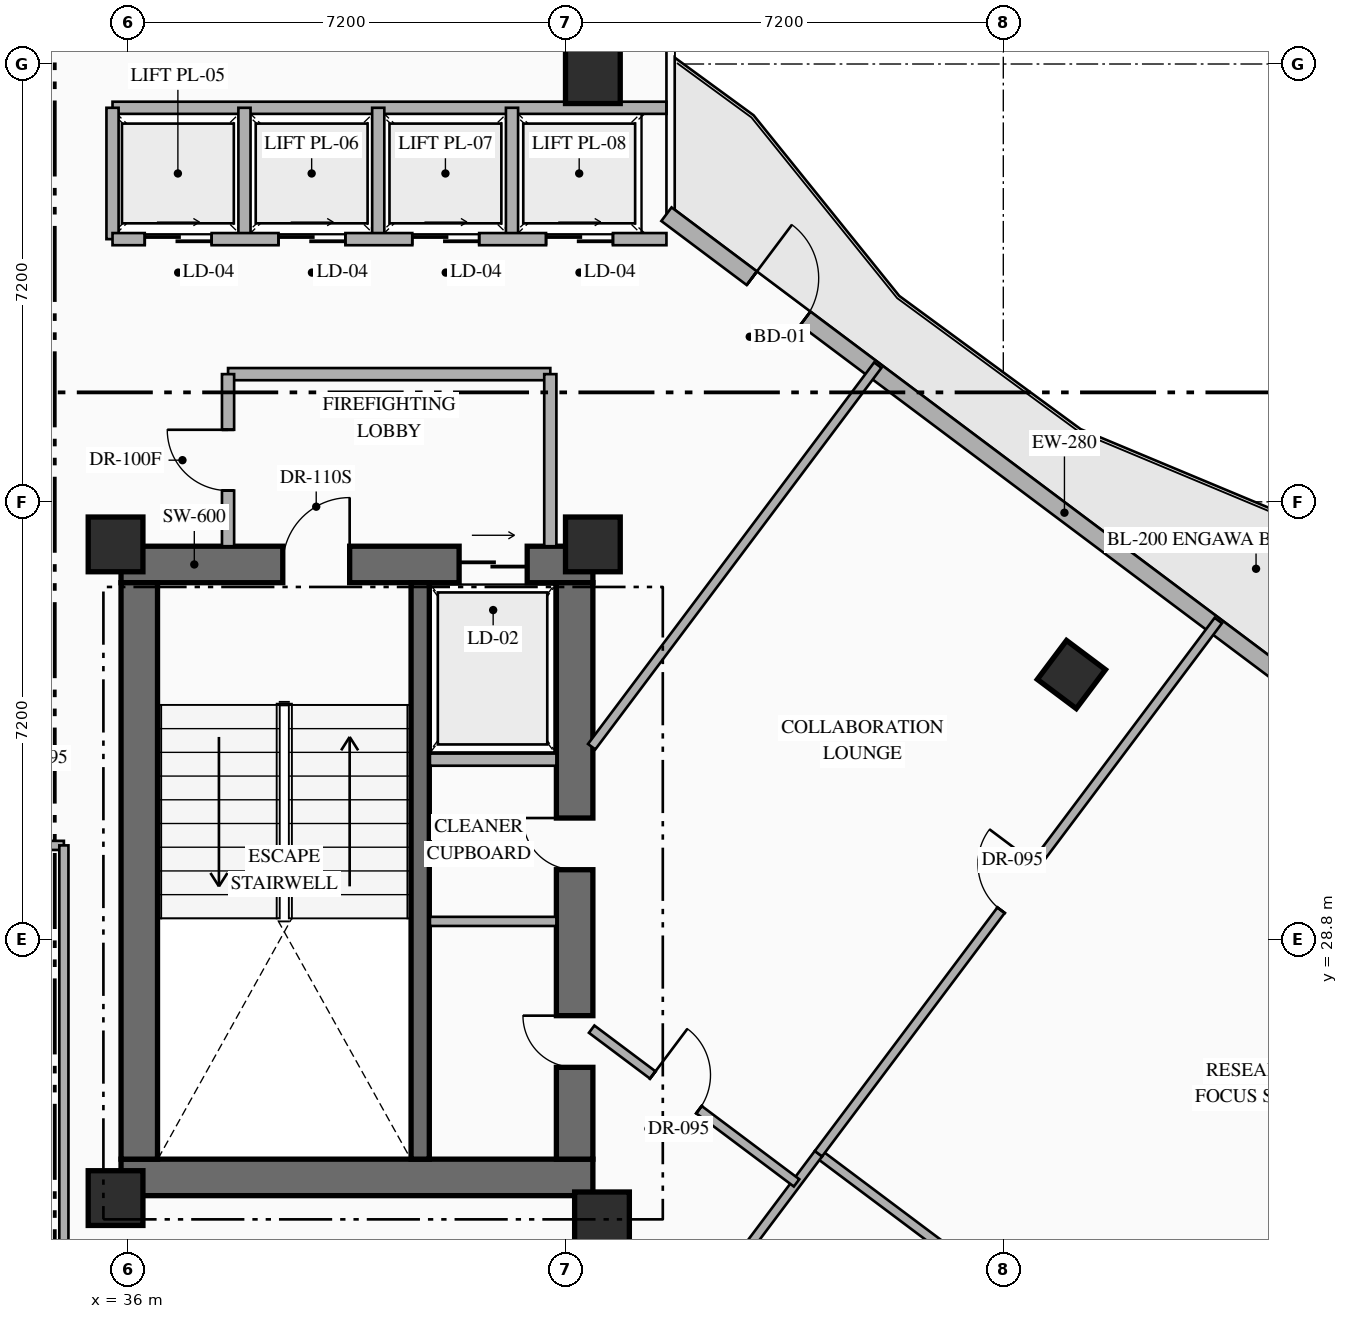
"""IFC4 building model, lengths in metres.
Left out: names, types, materials, properties, quantities, classifications, styles, units other than length and angle.
Written with IfcOpenShell. Run it as: python <this file> out.ifc"""

import sys

from ifc_helpers import new_model, si_unit, direction, frame, frame_2d, origin, origin_2d, place, context, subcontext, project, spatial, rectangle, hollow_rectangle, extrude, element, fill, save


model = new_model("IFC4")
c1 = context("Model", 3, precision=1e-05, world=origin(), true_north=direction((0.0, 1.0)))
c2 = subcontext(c1, "Body", "Model", "MODEL_VIEW")
j1 = project(units=[si_unit("LENGTHUNIT", "METRE"), si_unit("PLANEANGLEUNIT", "RADIAN")], contexts=[c1])
p1 = place(None, origin())
s1 = spatial("IfcSite", under=j1, at=p1, CompositionType="ELEMENT")
p2 = place(p1, origin())
s2 = spatial("IfcBuilding", under=s1, at=p2, CompositionType="ELEMENT")
p3 = place(p2, frame((0.0, 0.0, 174.45)))
s3 = spatial("IfcBuildingStorey", under=s2, at=p3, CompositionType="ELEMENT", Elevation=174.45)
p4 = place(p3, frame((35.89, 24.89, 0.0), z_axis=(0.0, 0.0, 1.0), x_axis=(1.0, 0.0, 0.0)))
e1 = element("IfcWall", 1, at=p4, inside=s3, PredefinedType="SHEAR", context=c2, shape_type="SweptSolid", body=[
    extrude(rectangle(XDim=7.76, YDim=0.6, at=frame_2d((3.88, 0.0))), origin(), (0.0, 0.0, 1.0), 3.6),
])
p5 = place(p3, frame((35.89, 34.97, 0.0), z_axis=(0.0, 0.0, 1.0), x_axis=(1.0, 0.0, 0.0)))
e2 = element("IfcWall", 2, at=p5, inside=s3, PredefinedType="SHEAR", context=c2, shape_type="SweptSolid", body=[
    extrude(rectangle(XDim=7.76, YDim=0.6, at=frame_2d((3.88, 0.0))), origin(), (0.0, 0.0, 1.0), 3.6),
])
p6 = place(p5, frame((2.66, 0.0, 0.0)))
e3 = element("IfcOpeningElement", 3, at=p6, cuts=e2, PredefinedType="OPENING", context=c2, shape_type="SweptSolid", body=[
    extrude(rectangle(XDim=1.1, YDim=2.2, at=frame_2d((0.55, 1.1))), frame((0.0, 0.31, 0.0), z_axis=(0.0, -1.0, 0.0), x_axis=(1.0, 0.0, 0.0)), (0.0, 0.0, 1.0), 0.62),
])
p7 = place(p5, frame((5.56, 0.0, 0.0)))
e4 = element("IfcOpeningElement", 4, at=p7, cuts=e2, PredefinedType="OPENING", context=c2, shape_type="SweptSolid", body=[
    extrude(rectangle(XDim=1.12, YDim=2.15, at=frame_2d((0.56, 1.075))), frame((0.0, 0.31, 0.0), z_axis=(0.0, -1.0, 0.0), x_axis=(1.0, 0.0, 0.0)), (0.0, 0.0, 1.0), 0.62),
])
p8 = place(p3, frame((36.19, 25.19, 0.0), z_axis=(0.0, 0.0, 1.0), x_axis=(0.0, 1.0, 0.0)))
e5 = element("IfcWall", 5, at=p8, inside=s3, PredefinedType="SHEAR", context=c2, shape_type="SweptSolid", body=[
    extrude(rectangle(XDim=9.48, YDim=0.6, at=frame_2d((4.74, 0.0))), origin(), (0.0, 0.0, 1.0), 3.6),
])
p9 = place(p3, frame((43.35, 25.19, 0.0), z_axis=(0.0, 0.0, 1.0), x_axis=(0.0, 1.0, 0.0)))
e6 = element("IfcWall", 6, at=p9, inside=s3, PredefinedType="SHEAR", context=c2, shape_type="SweptSolid", body=[
    extrude(rectangle(XDim=9.48, YDim=0.6, at=frame_2d((4.74, 0.0))), origin(), (0.0, 0.0, 1.0), 3.6),
])
p10 = place(p9, frame((1.51, 0.0, 0.0)))
e7 = element("IfcOpeningElement", 7, at=p10, cuts=e6, PredefinedType="OPENING", context=c2, shape_type="SweptSolid", body=[
    extrude(rectangle(XDim=0.85, YDim=2.08, at=frame_2d((0.425, 1.04))), frame((0.0, 0.31, 0.0), z_axis=(0.0, -1.0, 0.0), x_axis=(1.0, 0.0, 0.0)), (0.0, 0.0, 1.0), 0.62),
])
p11 = place(p9, frame((4.76, 0.0, 0.0)))
e8 = element("IfcOpeningElement", 8, at=p11, cuts=e6, PredefinedType="OPENING", context=c2, shape_type="SweptSolid", body=[
    extrude(rectangle(XDim=0.85, YDim=2.08, at=frame_2d((0.425, 1.04))), frame((0.0, 0.31, 0.0), z_axis=(0.0, -1.0, 0.0), x_axis=(1.0, 0.0, 0.0)), (0.0, 0.0, 1.0), 0.62),
])
p12 = place(p3, frame((40.81, 25.19, 0.0), z_axis=(0.0, 0.0, 1.0), x_axis=(0.0, 1.0, 0.0)))
e9 = element("IfcWall", 9, at=p12, inside=s3, PredefinedType="SHEAR", context=c2, shape_type="SweptSolid", body=[
    extrude(rectangle(XDim=9.48, YDim=0.3, at=frame_2d((4.74, 0.0))), origin(), (0.0, 0.0, 1.0), 3.6),
])
for number, where, z_axis, x_axis in (
    (10, (35.8, 24.55, 0.0), (0.0, 0.0, 1.0), (1.0, 0.0, 0.0)),
    (11, (43.8, 24.2, 0.0), (0.0, 0.0, 1.0), (1.0, 0.0, 0.0)),
    (12, (35.8, 35.3, 0.0), (0.0, 0.0, 1.0), (1.0, 0.0, 0.0)),
    (13, (43.65, 35.3, 0.0), (0.0, 0.0, 1.0), (1.0, 0.0, 0.0)),
    (14, (43.65, 43.0, 0.0), (0.0, 0.0, 1.0), (1.0, 0.0, 0.0)),
):
    element("IfcColumn", number, at=place(p3, frame(where, z_axis=z_axis, x_axis=x_axis)), inside=s3, PredefinedType="COLUMN", context=c2, shape_type="SweptSolid", body=[
        extrude(rectangle(XDim=0.9, YDim=0.9, at=origin_2d()), origin(), (0.0, 0.0, 1.0), 3.6),
    ])
p13 = place(p3, frame((51.52, 33.16, 0.0), z_axis=(0.0, 0.0, 1.0), x_axis=(0.799999996291, -0.600000004945, 0.0)))
e15 = element("IfcColumn", 15, at=p13, inside=s3, PredefinedType="COLUMN", context=c2, shape_type="SweptSolid", body=[
    extrude(hollow_rectangle(XDim=0.8, YDim=0.8, WallThickness=0.032, at=origin_2d()), origin(), (0.0, 0.0, 1.0), 3.6),
])
p14 = place(p3, frame((44.86, 40.73, 0.0), z_axis=(0.0, 0.0, 1.0), x_axis=(0.800007624502, -0.599989833863, 0.0)))
e16 = element("IfcWall", 16, at=p14, inside=s3, PredefinedType="STANDARD", context=c2, shape_type="SweptSolid", body=[
    extrude(rectangle(XDim=19.212, YDim=0.28, at=frame_2d((9.606, 0.0))), origin(), (0.0, 0.0, 1.0), 3.35),
])
p15 = place(p14, frame((1.755, 0.0, 0.0)))
e17 = element("IfcOpeningElement", 17, at=p15, cuts=e16, PredefinedType="OPENING", context=c2, shape_type="SweptSolid", body=[
    extrude(rectangle(XDim=1.1, YDim=2.2, at=frame_2d((0.55, 1.1))), frame((0.0, 0.15, 0.0), z_axis=(0.0, -1.0, 0.0), x_axis=(1.0, 0.0, 0.0)), (0.0, 0.0, 1.0), 0.3),
])
p16 = place(p14, frame((13.509, 0.0, 0.85)))
e18 = element("IfcOpeningElement", 18, at=p16, cuts=e16, PredefinedType="OPENING", context=c2, shape_type="SweptSolid", body=[
    extrude(rectangle(XDim=1.8, YDim=2.1, at=frame_2d((0.9, 1.05))), frame((0.0, 0.15, 0.0), z_axis=(0.0, -1.0, 0.0), x_axis=(1.0, 0.0, 0.0)), (0.0, 0.0, 1.0), 0.3),
])
p17 = place(p3, frame((40.97, 31.76, 0.0), z_axis=(0.0, 0.0, 1.0), x_axis=(1.0, 0.0, 0.0)))
e19 = element("IfcWall", 19, at=p17, inside=s3, PredefinedType="STANDARD", context=c2, shape_type="SweptSolid", body=[
    extrude(rectangle(XDim=2.08, YDim=0.2, at=frame_2d((1.04, 0.0))), origin(), (0.0, 0.0, 1.0), 3.35),
])
p18 = place(p3, frame((40.97, 29.1, 0.0), z_axis=(0.0, 0.0, 1.0), x_axis=(1.0, 0.0, 0.0)))
e20 = element("IfcWall", 20, at=p18, inside=s3, PredefinedType="PARTITIONING", context=c2, shape_type="SweptSolid", body=[
    extrude(rectangle(XDim=2.08, YDim=0.15, at=frame_2d((1.04, 0.0))), origin(), (0.0, 0.0, 1.0), 3.35),
])
p19 = place(p3, frame((37.65, 38.1, 0.0), z_axis=(0.0, 0.0, 1.0), x_axis=(1.0, 0.0, 0.0)))
e21 = element("IfcWall", 21, at=p19, inside=s3, PredefinedType="STANDARD", context=c2, shape_type="SweptSolid", body=[
    extrude(rectangle(XDim=5.3, YDim=0.2, at=frame_2d((2.65, 0.0))), origin(), (0.0, 0.0, 1.0), 3.35),
])
p20 = place(p3, frame((42.95, 35.27, 0.0), z_axis=(0.0, 0.0, 1.0), x_axis=(0.0, 1.0, 0.0)))
e22 = element("IfcWall", 22, at=p20, inside=s3, PredefinedType="STANDARD", context=c2, shape_type="SweptSolid", body=[
    extrude(rectangle(XDim=2.83, YDim=0.2, at=frame_2d((1.415, 0.0))), origin(), (0.0, 0.0, 1.0), 3.35),
])
p21 = place(p3, frame((37.65, 35.27, 0.0), z_axis=(0.0, 0.0, 1.0), x_axis=(0.0, 1.0, 0.0)))
e23 = element("IfcWall", 23, at=p21, inside=s3, PredefinedType="STANDARD", context=c2, shape_type="SweptSolid", body=[
    extrude(rectangle(XDim=2.83, YDim=0.2, at=frame_2d((1.415, 0.0))), origin(), (0.0, 0.0, 1.0), 3.35),
])
p22 = place(p21, frame((0.915, 0.0, 0.0)))
e24 = element("IfcOpeningElement", 24, at=p22, cuts=e23, PredefinedType="OPENING", context=c2, shape_type="SweptSolid", body=[
    extrude(rectangle(XDim=1.0, YDim=2.2, at=frame_2d((0.5, 1.1))), frame((0.0, 0.11, 0.0), z_axis=(0.0, -1.0, 0.0), x_axis=(1.0, 0.0, 0.0)), (0.0, 0.0, 1.0), 0.22),
])
p23 = place(p3, frame((35.75, 42.48, 0.0), z_axis=(0.0, 0.0, 1.0), x_axis=(1.0, 0.0, 0.0)))
e25 = element("IfcWall", 25, at=p23, inside=s3, PredefinedType="STANDARD", context=c2, shape_type="SweptSolid", body=[
    extrude(rectangle(XDim=9.11, YDim=0.2, at=frame_2d((4.555, 0.0))), origin(), (0.0, 0.0, 1.0), 3.35),
])
for number, where, z_axis, x_axis in (
    (26, (35.75, 40.32, 0.0), (0.0, 0.0, 1.0), (0.0, 1.0, 0.0)),
    (27, (37.92, 40.32, 0.0), (0.0, 0.0, 1.0), (0.0, 1.0, 0.0)),
    (28, (40.12, 40.32, 0.0), (0.0, 0.0, 1.0), (0.0, 1.0, 0.0)),
    (29, (42.32, 40.32, 0.0), (0.0, 0.0, 1.0), (0.0, 1.0, 0.0)),
):
    element("IfcWall", number, at=place(p3, frame(where, z_axis=z_axis, x_axis=x_axis)), inside=s3, PredefinedType="STANDARD", context=c2, shape_type="SweptSolid", body=[
        extrude(rectangle(XDim=2.16, YDim=0.2, at=frame_2d((1.08, 0.0))), origin(), (0.0, 0.0, 1.0), 3.35),
    ])
p24 = place(p3, frame((35.75, 40.32, 0.0), z_axis=(0.0, 0.0, 1.0), x_axis=(1.0, 0.0, 0.0)))
e30 = element("IfcWall", 30, at=p24, inside=s3, PredefinedType="STANDARD", context=c2, shape_type="SweptSolid", body=[
    extrude(rectangle(XDim=9.11, YDim=0.2, at=frame_2d((4.555, 0.0))), origin(), (0.0, 0.0, 1.0), 3.35),
])
p25 = place(p24, frame((0.53, 0.0, 0.0)))
e31 = element("IfcOpeningElement", 31, at=p25, cuts=e30, PredefinedType="OPENING", context=c2, shape_type="SweptSolid", body=[
    extrude(rectangle(XDim=1.1, YDim=2.18, at=frame_2d((0.55, 1.09))), frame((0.0, 0.11, 0.0), z_axis=(0.0, -1.0, 0.0), x_axis=(1.0, 0.0, 0.0)), (0.0, 0.0, 1.0), 0.22),
])
p26 = place(p24, frame((2.73, 0.0, 0.0)))
e32 = element("IfcOpeningElement", 32, at=p26, cuts=e30, PredefinedType="OPENING", context=c2, shape_type="SweptSolid", body=[
    extrude(rectangle(XDim=1.1, YDim=2.18, at=frame_2d((0.55, 1.09))), frame((0.0, 0.11, 0.0), z_axis=(0.0, -1.0, 0.0), x_axis=(1.0, 0.0, 0.0)), (0.0, 0.0, 1.0), 0.22),
])
p27 = place(p24, frame((4.93, 0.0, 0.0)))
e33 = element("IfcOpeningElement", 33, at=p27, cuts=e30, PredefinedType="OPENING", context=c2, shape_type="SweptSolid", body=[
    extrude(rectangle(XDim=1.1, YDim=2.18, at=frame_2d((0.55, 1.09))), frame((0.0, 0.11, 0.0), z_axis=(0.0, -1.0, 0.0), x_axis=(1.0, 0.0, 0.0)), (0.0, 0.0, 1.0), 0.22),
])
p28 = place(p24, frame((7.13, 0.0, 0.0)))
e34 = element("IfcOpeningElement", 34, at=p28, cuts=e30, PredefinedType="OPENING", context=c2, shape_type="SweptSolid", body=[
    extrude(rectangle(XDim=1.1, YDim=2.18, at=frame_2d((0.55, 1.09))), frame((0.0, 0.11, 0.0), z_axis=(0.0, -1.0, 0.0), x_axis=(1.0, 0.0, 0.0)), (0.0, 0.0, 1.0), 0.22),
])
p29 = place(p3, frame((30.5, 30.35, 0.0), z_axis=(0.0, 0.0, 1.0), x_axis=(1.0, 0.0, 0.0)))
e35 = element("IfcWall", 35, at=p29, inside=s3, PredefinedType="PARTITIONING", context=c2, shape_type="SweptSolid", body=[
    extrude(rectangle(XDim=4.45, YDim=0.15, at=frame_2d((2.225, 0.0))), origin(), (0.0, 0.0, 1.0), 3.35),
])
p30 = place(p29, frame((2.846, 0.0, 0.0)))
e36 = element("IfcOpeningElement", 36, at=p30, cuts=e35, PredefinedType="OPENING", context=c2, shape_type="SweptSolid", body=[
    extrude(rectangle(XDim=0.95, YDim=2.15, at=frame_2d((0.475, 1.075))), frame((0.0, 0.085, 0.0), z_axis=(0.0, -1.0, 0.0), x_axis=(1.0, 0.0, 0.0)), (0.0, 0.0, 1.0), 0.17),
])
p31 = place(p3, frame((34.95, 23.2, 0.0), z_axis=(0.0, 0.0, 1.0), x_axis=(0.0, 1.0, 0.0)))
e37 = element("IfcWall", 37, at=p31, inside=s3, PredefinedType="PARTITIONING", context=c2, shape_type="SweptSolid", body=[
    extrude(rectangle(XDim=7.15, YDim=0.15, at=frame_2d((3.575, 0.0))), origin(), (0.0, 0.0, 1.0), 3.35),
])
p32 = place(p3, frame((47.36, 25.28, 0.0), z_axis=(0.0, 0.0, 1.0), x_axis=(0.799991516197, -0.600011311571, 0.0)))
e38 = element("IfcWall", 38, at=p32, inside=s3, PredefinedType="PARTITIONING", context=c2, shape_type="SweptSolid", body=[
    extrude(rectangle(XDim=10.36, YDim=0.15, at=frame_2d((5.18, 0.0))), origin(), (0.0, 0.0, 1.0), 3.35),
])
p33 = place(p3, frame((41.87, 17.96, 0.0), z_axis=(0.0, 0.0, 1.0), x_axis=(0.599995730889, 0.800003201816, 0.0)))
e39 = element("IfcWall", 39, at=p33, inside=s3, PredefinedType="PARTITIONING", context=c2, shape_type="SweptSolid", body=[
    extrude(rectangle(XDim=9.15, YDim=0.15, at=frame_2d((4.575, 0.0))), origin(), (0.0, 0.0, 1.0), 3.35),
])
p34 = place(p33, frame((4.1, 0.0, 0.0)))
e40 = element("IfcOpeningElement", 40, at=p34, cuts=e39, PredefinedType="OPENING", context=c2, shape_type="SweptSolid", body=[
    extrude(rectangle(XDim=0.95, YDim=2.15, at=frame_2d((0.475, 1.075))), frame((0.0, 0.085, 0.0), z_axis=(0.0, -1.0, 0.0), x_axis=(1.0, 0.0, 0.0)), (0.0, 0.0, 1.0), 0.17),
])
p35 = place(p3, frame((47.36, 25.28, 0.0), z_axis=(0.0, 0.0, 1.0), x_axis=(0.599992871789, 0.800005346109, 0.0)))
e41 = element("IfcWall", 41, at=p35, inside=s3, PredefinedType="PARTITIONING", context=c2, shape_type="SweptSolid", body=[
    extrude(rectangle(XDim=10.96, YDim=0.15, at=frame_2d((5.48, 0.0))), origin(), (0.0, 0.0, 1.0), 3.35),
])
p36 = place(p35, frame((5.005, 0.0, 0.0)))
e42 = element("IfcOpeningElement", 42, at=p36, cuts=e41, PredefinedType="OPENING", context=c2, shape_type="SweptSolid", body=[
    extrude(rectangle(XDim=0.95, YDim=2.15, at=frame_2d((0.475, 1.075))), frame((0.0, 0.085, 0.0), z_axis=(0.0, -1.0, 0.0), x_axis=(1.0, 0.0, 0.0)), (0.0, 0.0, 1.0), 0.17),
])
p37 = place(p3, frame((43.63, 27.328, 0.0), z_axis=(0.0, 0.0, 1.0), x_axis=(0.799972182084, -0.600037088764, 0.0)))
e43 = element("IfcWall", 43, at=p37, inside=s3, PredefinedType="PARTITIONING", context=c2, shape_type="SweptSolid", body=[
    extrude(rectangle(XDim=4.213, YDim=0.15, at=frame_2d((2.106, 0.0))), origin(), (0.0, 0.0, 1.0), 3.045),
])
p38 = place(p37, frame((1.256, 0.0, 0.0)))
e44 = element("IfcOpeningElement", 44, at=p38, cuts=e43, PredefinedType="OPENING", context=c2, shape_type="SweptSolid", body=[
    extrude(rectangle(XDim=0.95, YDim=2.15, at=frame_2d((0.475, 1.075))), frame((0.0, 0.085, 0.0), z_axis=(0.0, -1.0, 0.0), x_axis=(1.0, 0.0, 0.0)), (0.0, 0.0, 1.0), 0.17),
])
p39 = place(p3, frame((43.63, 31.973, 0.0), z_axis=(0.0, 0.0, 1.0), x_axis=(0.599975099311, 0.800018674911, 0.0)))
e45 = element("IfcWall", 45, at=p39, inside=s3, PredefinedType="PARTITIONING", context=c2, shape_type="SweptSolid", body=[
    extrude(rectangle(XDim=7.844, YDim=0.15, at=frame_2d((3.922, 0.0))), origin(), (0.0, 0.0, 1.0), 3.35),
])
p40 = place(p3, frame((27.91, 26.68, 0.0), z_axis=(0.0, 0.0, 1.0), x_axis=(0.800005938517, -0.599992081896, 0.0)))
e46 = element("IfcWall", 46, at=p40, inside=s3, PredefinedType="PARTITIONING", context=c2, shape_type="SweptSolid", body=[
    extrude(rectangle(XDim=14.8, YDim=0.15, at=frame_2d((7.4, 0.0))), origin(), (0.0, 0.0, 1.0), 3.35),
])
p41 = place(p40, frame((9.281, 0.0, 0.0)))
e47 = element("IfcOpeningElement", 47, at=p41, cuts=e46, PredefinedType="OPENING", context=c2, shape_type="SweptSolid", body=[
    extrude(rectangle(XDim=0.95, YDim=2.15, at=frame_2d((0.475, 1.075))), frame((0.0, 0.085, 0.0), z_axis=(0.0, -1.0, 0.0), x_axis=(1.0, 0.0, 0.0)), (0.0, 0.0, 1.0), 0.17),
])
p42 = place(p15, origin())
e48 = element("IfcDoor", 48, at=p42, inside=s3, OperationType="SINGLE_SWING_LEFT", PredefinedType="DOOR", context=c2, shape_type="SweptSolid", body=[
    extrude(rectangle(XDim=1.1, YDim=2.2, at=frame_2d((0.55, 1.1))), frame((0.0, 0.025, 0.0), z_axis=(0.0, -1.0, 0.0), x_axis=(1.0, 0.0, 0.0)), (0.0, 0.0, 1.0), 0.05),
])
fill(e17, e48)
p43 = place(p6, origin())
e49 = element("IfcDoor", 49, at=p43, inside=s3, OperationType="SINGLE_SWING_RIGHT", PredefinedType="DOOR", context=c2, shape_type="SweptSolid", body=[
    extrude(rectangle(XDim=1.1, YDim=2.2, at=frame_2d((0.55, 1.1))), frame((0.0, 0.025, 0.0), z_axis=(0.0, -1.0, 0.0), x_axis=(1.0, 0.0, 0.0)), (0.0, 0.0, 1.0), 0.05),
])
fill(e3, e49)
p44 = place(p7, origin())
e50 = element("IfcDoor", 50, at=p44, inside=s3, OperationType="SLIDING_TO_RIGHT", PredefinedType="USERDEFINED", context=c2, shape_type="SweptSolid", body=[
    extrude(rectangle(XDim=1.12, YDim=2.15, at=frame_2d((0.56, 1.075))), frame((0.0, 0.025, 0.0), z_axis=(0.0, -1.0, 0.0), x_axis=(1.0, 0.0, 0.0)), (0.0, 0.0, 1.0), 0.05),
])
fill(e4, e50)
p45 = place(p10, origin())
e51 = element("IfcDoor", 51, at=p45, inside=s3, OperationType="SINGLE_SWING_RIGHT", PredefinedType="DOOR", context=c2, shape_type="SweptSolid", body=[
    extrude(rectangle(XDim=0.85, YDim=2.08, at=frame_2d((0.425, 1.04))), frame((0.0, 0.025, 0.0), z_axis=(0.0, -1.0, 0.0), x_axis=(1.0, 0.0, 0.0)), (0.0, 0.0, 1.0), 0.05),
])
fill(e7, e51)
p46 = place(p11, origin())
e52 = element("IfcDoor", 52, at=p46, inside=s3, OperationType="SINGLE_SWING_RIGHT", PredefinedType="DOOR", context=c2, shape_type="SweptSolid", body=[
    extrude(rectangle(XDim=0.85, YDim=2.08, at=frame_2d((0.425, 1.04))), frame((0.0, 0.025, 0.0), z_axis=(0.0, -1.0, 0.0), x_axis=(1.0, 0.0, 0.0)), (0.0, 0.0, 1.0), 0.05),
])
fill(e8, e52)
p47 = place(p22, origin())
e53 = element("IfcDoor", 53, at=p47, inside=s3, OperationType="SINGLE_SWING_RIGHT", PredefinedType="DOOR", context=c2, shape_type="SweptSolid", body=[
    extrude(rectangle(XDim=1.0, YDim=2.2, at=frame_2d((0.5, 1.1))), frame((0.0, 0.025, 0.0), z_axis=(0.0, -1.0, 0.0), x_axis=(1.0, 0.0, 0.0)), (0.0, 0.0, 1.0), 0.05),
])
fill(e24, e53)
p48 = place(p25, origin())
e54 = element("IfcDoor", 54, at=p48, inside=s3, OperationType="SLIDING_TO_RIGHT", PredefinedType="USERDEFINED", context=c2, shape_type="SweptSolid", body=[
    extrude(rectangle(XDim=1.1, YDim=2.18, at=frame_2d((0.55, 1.09))), frame((0.0, 0.025, 0.0), z_axis=(0.0, -1.0, 0.0), x_axis=(1.0, 0.0, 0.0)), (0.0, 0.0, 1.0), 0.05),
])
fill(e31, e54)
p49 = place(p26, origin())
e55 = element("IfcDoor", 55, at=p49, inside=s3, OperationType="SLIDING_TO_RIGHT", PredefinedType="USERDEFINED", context=c2, shape_type="SweptSolid", body=[
    extrude(rectangle(XDim=1.1, YDim=2.18, at=frame_2d((0.55, 1.09))), frame((0.0, 0.025, 0.0), z_axis=(0.0, -1.0, 0.0), x_axis=(1.0, 0.0, 0.0)), (0.0, 0.0, 1.0), 0.05),
])
fill(e32, e55)
p50 = place(p27, origin())
e56 = element("IfcDoor", 56, at=p50, inside=s3, OperationType="SLIDING_TO_RIGHT", PredefinedType="USERDEFINED", context=c2, shape_type="SweptSolid", body=[
    extrude(rectangle(XDim=1.1, YDim=2.18, at=frame_2d((0.55, 1.09))), frame((0.0, 0.025, 0.0), z_axis=(0.0, -1.0, 0.0), x_axis=(1.0, 0.0, 0.0)), (0.0, 0.0, 1.0), 0.05),
])
fill(e33, e56)
p51 = place(p28, origin())
e57 = element("IfcDoor", 57, at=p51, inside=s3, OperationType="SLIDING_TO_RIGHT", PredefinedType="USERDEFINED", context=c2, shape_type="SweptSolid", body=[
    extrude(rectangle(XDim=1.1, YDim=2.18, at=frame_2d((0.55, 1.09))), frame((0.0, 0.025, 0.0), z_axis=(0.0, -1.0, 0.0), x_axis=(1.0, 0.0, 0.0)), (0.0, 0.0, 1.0), 0.05),
])
fill(e34, e57)
p52 = place(p36, origin())
e58 = element("IfcDoor", 58, at=p52, inside=s3, OperationType="SINGLE_SWING_RIGHT", PredefinedType="DOOR", context=c2, shape_type="SweptSolid", body=[
    extrude(rectangle(XDim=0.95, YDim=2.15, at=frame_2d((0.475, 1.075))), frame((0.0, 0.025, 0.0), z_axis=(0.0, -1.0, 0.0), x_axis=(1.0, 0.0, 0.0)), (0.0, 0.0, 1.0), 0.05),
])
fill(e42, e58)
p53 = place(p38, origin())
e59 = element("IfcDoor", 59, at=p53, inside=s3, OperationType="SINGLE_SWING_LEFT", PredefinedType="DOOR", context=c2, shape_type="SweptSolid", body=[
    extrude(rectangle(XDim=0.95, YDim=2.15, at=frame_2d((0.475, 1.075))), frame((0.0, 0.025, 0.0), z_axis=(0.0, -1.0, 0.0), x_axis=(1.0, 0.0, 0.0)), (0.0, 0.0, 1.0), 0.05),
])
fill(e44, e59)
save(model, sys.argv[1])
